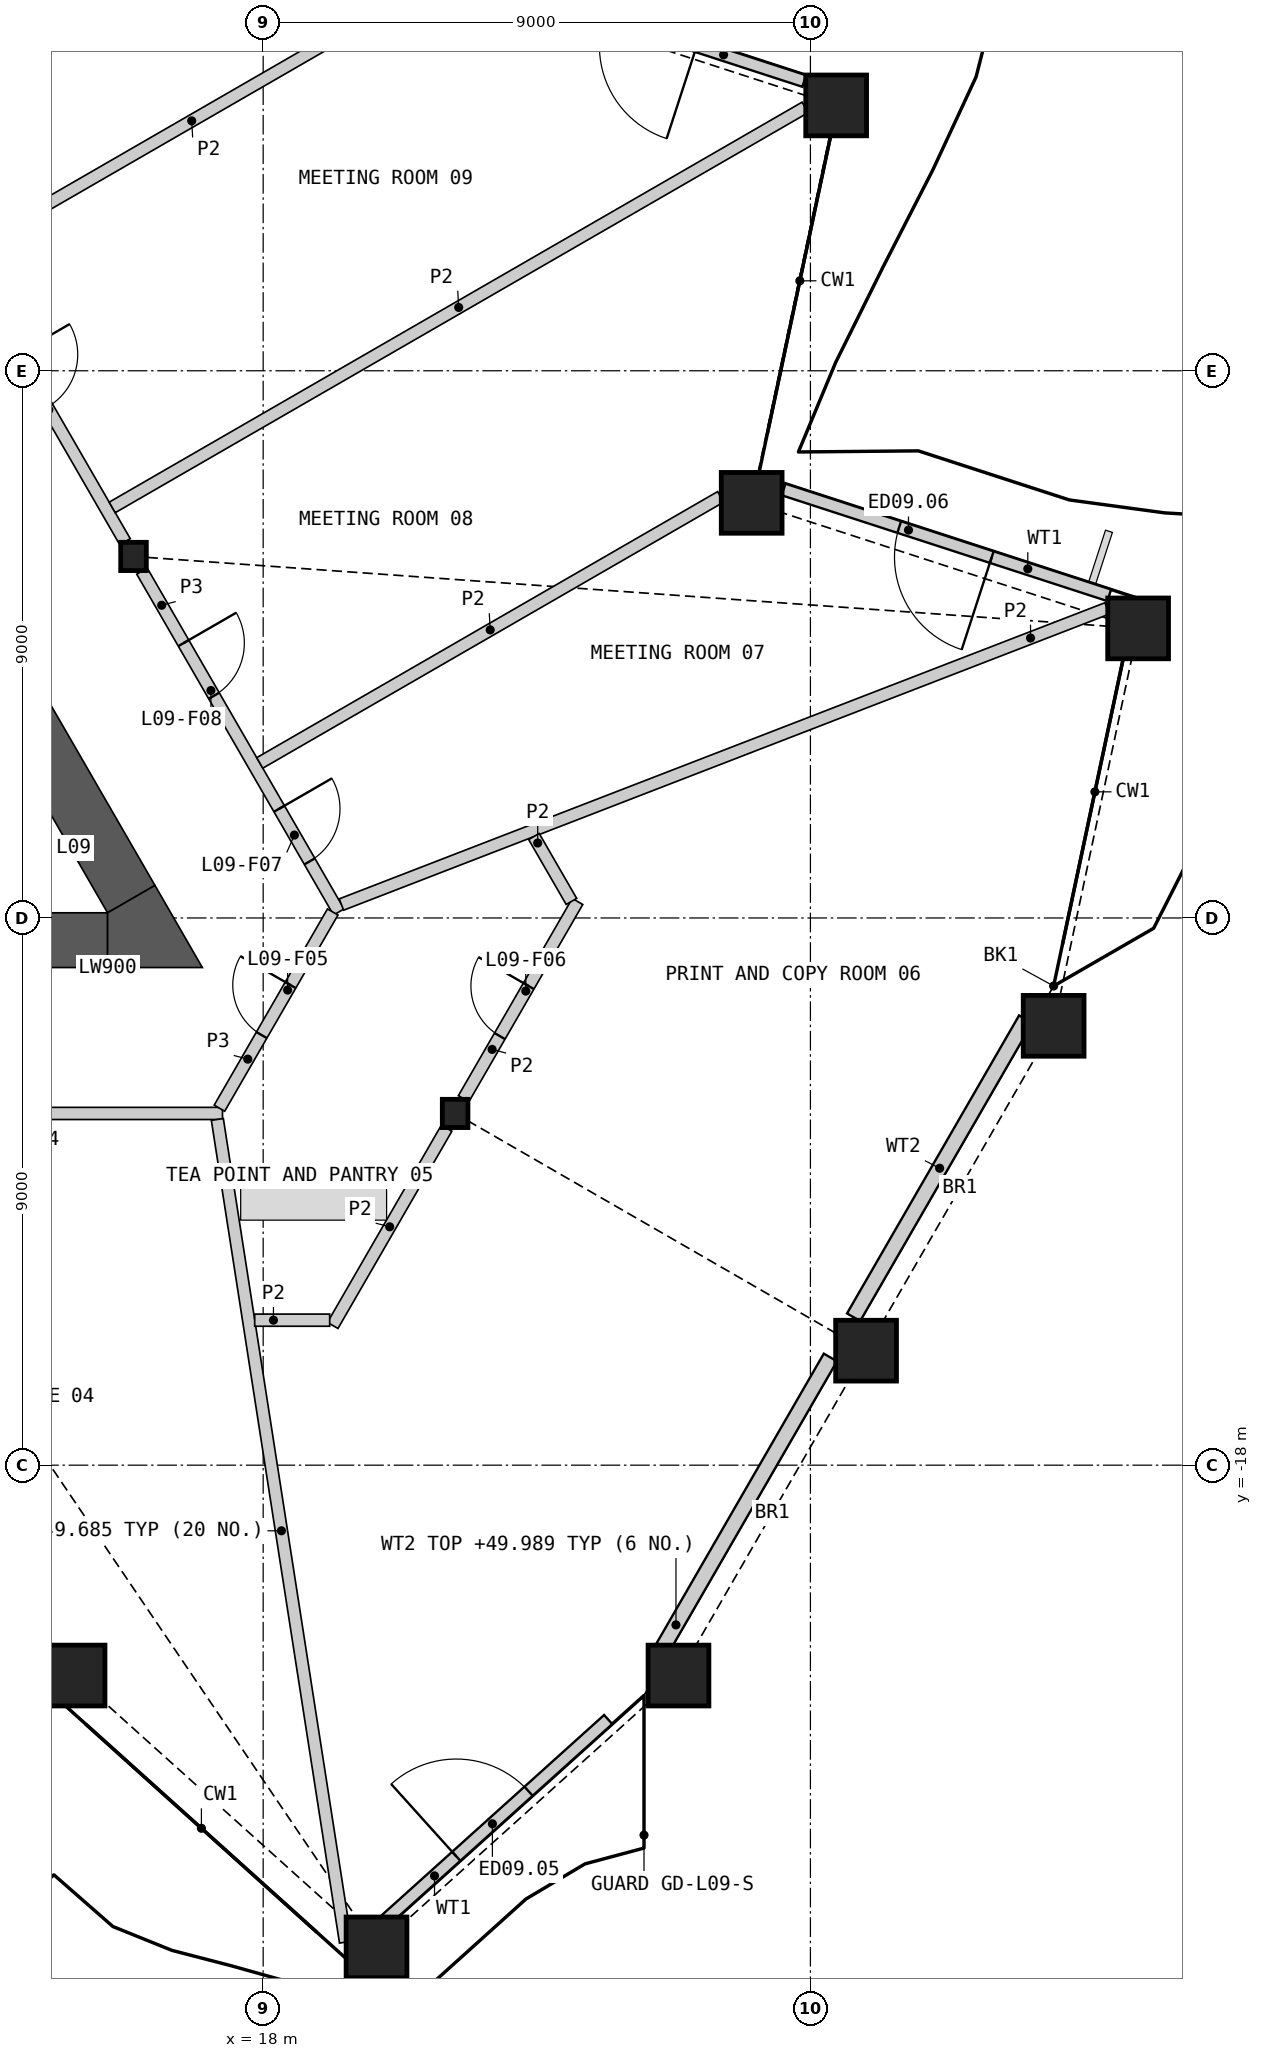
"""IFC4 building model, lengths in metres.
Left out: names, types, materials, properties, quantities, classifications, styles, units other than length and angle.
Written with IfcOpenShell. Run it as: python <this file> out.ifc"""

import sys

from ifc_helpers import new_model, si_unit, direction, frame, frame_2d, origin, origin_2d, place, context, subcontext, project, spatial, polyline, rectangle, hollow_rectangle, i_section, outline, extrude, element, fill, save


model = new_model("IFC4")
c1 = context("Model", 3, precision=1e-05, world=origin(), true_north=direction((0.0, 1.0)))
c2 = subcontext(c1, "Body", "Model", "MODEL_VIEW")
j1 = project(units=[si_unit("LENGTHUNIT", "METRE"), si_unit("PLANEANGLEUNIT", "RADIAN")], contexts=[c1])
p1 = place(None, origin())
s1 = spatial("IfcSite", under=j1, at=p1, CompositionType="ELEMENT")
p2 = place(p1, origin())
s2 = spatial("IfcBuilding", under=s1, at=p2, CompositionType="ELEMENT")
p3 = place(p2, frame((0.0, 0.0, 46.8)))
s3 = spatial("IfcBuildingStorey", under=s2, at=p3, CompositionType="ELEMENT", Elevation=46.8)
for number, where, z_axis, x_axis in (
    (1, (14.898, -21.46, 0.0), (0.0, 0.0, 1.0), (1.0, 0.0, 0.0)),
    (2, (19.864, -25.931, 0.0), (0.0, 0.0, 1.0), (1.0, 0.0, 0.0)),
    (3, (24.83, -21.46, 0.0), (0.0, 0.0, 1.0), (1.0, 0.0, 0.0)),
    (4, (27.915, -16.117, 0.0), (0.0, 0.0, 1.0), (1.0, 0.0, 0.0)),
    (5, (31.0, -10.774, 0.0), (0.0, 0.0, 1.0), (1.0, 0.0, 0.0)),
    (6, (32.389, -4.237, 0.0), (0.0, 0.0, 1.0), (1.0, 0.0, 0.0)),
    (7, (26.034, -2.172, 0.0), (0.0, 0.0, 1.0), (1.0, 0.0, 0.0)),
    (8, (27.423, 4.364, 0.0), (0.0, 0.0, 1.0), (1.0, 0.0, 0.0)),
):
    element("IfcColumn", number, at=place(p3, frame(where, z_axis=z_axis, x_axis=x_axis)), inside=s3, PredefinedType="COLUMN", context=c2, shape_type="SweptSolid", body=[
        extrude(hollow_rectangle(XDim=1.0, YDim=1.0, WallThickness=0.07, at=origin_2d()), origin(), (0.0, 0.0, 1.0), 4.2),
    ])
for number, where, z_axis, x_axis in (
    (9, (21.157, -12.215, 0.0), (0.0, 0.0, 1.0), (1.0, 0.0, 0.0)),
    (10, (15.868, -3.054, 0.0), (0.0, 0.0, 1.0), (1.0, 0.0, 0.0)),
):
    element("IfcColumn", number, at=place(p3, frame(where, z_axis=z_axis, x_axis=x_axis)), inside=s3, PredefinedType="COLUMN", context=c2, shape_type="SweptSolid", body=[
        extrude(i_section(OverallWidth=0.421, OverallDepth=0.465, WebThickness=0.045, FlangeThickness=0.072, at=origin_2d()), origin(), (0.0, 0.0, 1.0), 4.2),
    ])
p4 = place(p3, frame((19.866, -25.612, 0.0), z_axis=(0.0, 0.0, 1.0), x_axis=(0.743159085791, 0.669114768337, 0.0)))
e11 = element("IfcWall", 11, at=p4, inside=s3, PredefinedType="SOLIDWALL", context=c2, shape_type="SweptSolid", body=[
    extrude(rectangle(XDim=5.124, YDim=0.2, at=frame_2d((2.562, 0.0))), origin(), (0.0, 0.0, 1.0), 3.189),
])
p5 = place(p4, frame((1.762, 0.0, 0.0)))
e12 = element("IfcOpeningElement", 12, at=p5, cuts=e11, PredefinedType="OPENING", context=c2, shape_type="SweptSolid", body=[
    extrude(rectangle(XDim=1.6, YDim=2.4, at=frame_2d((0.8, 1.2))), frame((0.0, 0.11, 0.0), z_axis=(0.0, -1.0, 0.0), x_axis=(1.0, 0.0, 0.0)), (0.0, 0.0, 1.0), 0.22),
])
p6 = place(p3, frame((24.507, -21.116, 0.0), z_axis=(0.0, 0.0, 1.0), x_axis=(0.49999579099, 0.866027833844, 0.0)))
e13 = element("IfcWall", 13, at=p6, inside=s3, PredefinedType="SOLIDWALL", context=c2, shape_type="SweptSolid", body=[
    extrude(rectangle(XDim=5.644, YDim=0.25, at=frame_2d((2.822, 0.0))), origin(), (0.0, 0.0, 1.0), 3.189),
])
p7 = place(p3, frame((27.71, -15.567, 0.0), z_axis=(0.0, 0.0, 1.0), x_axis=(0.499985074313, 0.866034020963, 0.0)))
e14 = element("IfcWall", 14, at=p7, inside=s3, PredefinedType="SOLIDWALL", context=c2, shape_type="SweptSolid", body=[
    extrude(rectangle(XDim=5.66, YDim=0.25, at=frame_2d((2.83, 0.0))), origin(), (0.0, 0.0, 1.0), 3.189),
])
p8 = place(p3, frame((31.914, -3.693, 0.0), z_axis=(0.0, 0.0, 1.0), x_axis=(-0.951049360908, 0.309039015525, 0.0)))
e15 = element("IfcWall", 15, at=p8, inside=s3, PredefinedType="SOLIDWALL", context=c2, shape_type="SweptSolid", body=[
    extrude(rectangle(XDim=5.631, YDim=0.2, at=frame_2d((2.815, 0.0))), origin(), (0.0, 0.0, 1.0), 3.189),
])
p9 = place(p8, frame((2.031, 0.0, 0.0)))
e16 = element("IfcOpeningElement", 16, at=p9, cuts=e15, PredefinedType="OPENING", context=c2, shape_type="SweptSolid", body=[
    extrude(rectangle(XDim=1.6, YDim=2.4, at=frame_2d((0.8, 1.2))), frame((0.0, 0.11, 0.0), z_axis=(0.0, -1.0, 0.0), x_axis=(1.0, 0.0, 0.0)), (0.0, 0.0, 1.0), 0.22),
])
p10 = place(p3, frame((26.899, 4.765, 0.0), z_axis=(0.0, 0.0, 1.0), x_axis=(-0.951054004345, 0.309024725255, 0.0)))
e17 = element("IfcWall", 17, at=p10, inside=s3, PredefinedType="SOLIDWALL", context=c2, shape_type="SweptSolid", body=[
    extrude(rectangle(XDim=5.579, YDim=0.2, at=frame_2d((2.79, 0.0))), origin(), (0.0, 0.0, 1.0), 3.189),
])
p11 = place(p10, frame((1.86, 0.0, 0.0)))
e18 = element("IfcOpeningElement", 18, at=p11, cuts=e17, PredefinedType="OPENING", context=c2, shape_type="SweptSolid", body=[
    extrude(rectangle(XDim=1.6, YDim=2.4, at=frame_2d((0.8, 1.2))), frame((0.0, 0.11, 0.0), z_axis=(0.0, -1.0, 0.0), x_axis=(1.0, 0.0, 0.0)), (0.0, 0.0, 1.0), 0.22),
])
p12 = place(p3, frame((13.379, -9.365, 0.0), z_axis=(0.0, 0.0, 1.0), x_axis=(1.0, 0.0, 0.0)))
e19 = element("IfcWall", 19, at=p12, inside=s3, PredefinedType="SHEAR", context=c2, shape_type="SweptSolid", body=[
    extrude(rectangle(XDim=2.062, YDim=0.9, at=frame_2d((1.031, 0.0))), origin(), (0.0, 0.0, 1.0), 3.8),
])
p13 = place(p3, frame((15.831, -8.69, 0.0), z_axis=(0.0, 0.0, 1.0), x_axis=(-0.499999419053, 0.866025739194, 0.0)))
e20 = element("IfcWall", 20, at=p13, inside=s3, PredefinedType="SHEAR", context=c2, shape_type="SweptSolid", body=[
    extrude(rectangle(XDim=5.952, YDim=0.9, at=frame_2d((2.976, 0.0))), origin(), (0.0, 0.0, 1.0), 3.8),
])
p14 = place(p3, origin())
e21 = element("IfcWall", 21, at=p14, inside=s3, PredefinedType="SHEAR", context=c2, shape_type="SweptSolid", body=[
    extrude(outline(polyline([(15.441, -9.815), (15.441, -8.915), (16.221, -8.465), (17.0, -9.815), (15.441, -9.815)])), origin(), (0.0, 0.0, 1.0), 3.8),
])
p15 = place(p3, frame((10.719, 5.865, 0.0), z_axis=(0.0, 0.0, 1.0), x_axis=(0.49999175339, -0.866030164915, 0.0)))
e22 = element("IfcWall", 22, at=p15, inside=s3, PredefinedType="PARTITIONING", context=c2, shape_type="SweptSolid", body=[
    extrude(rectangle(XDim=10.019, YDim=0.2, at=frame_2d((5.009, 0.0))), origin(), (0.0, 0.0, 1.0), 3.8),
])
p16 = place(p15, frame((6.464, 0.0, 0.0)))
e23 = element("IfcOpeningElement", 23, at=p16, cuts=e22, PredefinedType="OPENING", context=c2, shape_type="SweptSolid", body=[
    extrude(rectangle(XDim=1.0, YDim=2.1, at=frame_2d((0.5, 1.05))), frame((0.0, 0.11, 0.0), z_axis=(0.0, -1.0, 0.0), x_axis=(1.0, 0.0, 0.0)), (0.0, 0.0, 1.0), 0.22),
])
p17 = place(p15, frame((1.753, 0.0, 0.0)))
e24 = element("IfcOpeningElement", 24, at=p17, cuts=e22, PredefinedType="OPENING", context=c2, shape_type="SweptSolid", body=[
    extrude(rectangle(XDim=1.0, YDim=2.1, at=frame_2d((0.5, 1.05))), frame((0.0, 0.11, 0.0), z_axis=(0.0, -1.0, 0.0), x_axis=(1.0, 0.0, 0.0)), (0.0, 0.0, 1.0), 0.22),
])
p18 = place(p3, frame((10.821, -12.215, 0.0), z_axis=(0.0, 0.0, 1.0), x_axis=(1.0, 0.0, 0.0)))
e25 = element("IfcWall", 25, at=p18, inside=s3, PredefinedType="PARTITIONING", context=c2, shape_type="SweptSolid", body=[
    extrude(rectangle(XDim=6.51, YDim=0.2, at=frame_2d((3.255, 0.0))), origin(), (0.0, 0.0, 1.0), 3.8),
])
p19 = place(p18, frame((2.655, 0.0, 0.0)))
e26 = element("IfcOpeningElement", 26, at=p19, cuts=e25, PredefinedType="OPENING", context=c2, shape_type="SweptSolid", body=[
    extrude(rectangle(XDim=1.0, YDim=2.1, at=frame_2d((0.5, 1.05))), frame((0.0, 0.11, 0.0), z_axis=(0.0, -1.0, 0.0), x_axis=(1.0, 0.0, 0.0)), (0.0, 0.0, 1.0), 0.22),
])
p20 = place(p3, frame((16.008, -3.296, 0.0), z_axis=(0.0, 0.0, 1.0), x_axis=(0.499984737558, -0.86603421538, 0.0)))
e27 = element("IfcWall", 27, at=p20, inside=s3, PredefinedType="PARTITIONING", context=c2, shape_type="SweptSolid", body=[
    extrude(rectangle(XDim=6.473, YDim=0.2, at=frame_2d((3.236, 0.0))), origin(), (0.0, 0.0, 1.0), 3.8),
])
p21 = place(p20, frame((4.512, 0.0, 0.0)))
e28 = element("IfcOpeningElement", 28, at=p21, cuts=e27, PredefinedType="OPENING", context=c2, shape_type="SweptSolid", body=[
    extrude(rectangle(XDim=1.0, YDim=2.1, at=frame_2d((0.5, 1.05))), frame((0.0, 0.11, 0.0), z_axis=(0.0, -1.0, 0.0), x_axis=(1.0, 0.0, 0.0)), (0.0, 0.0, 1.0), 0.22),
])
p22 = place(p20, frame((1.366, 0.0, 0.0)))
e29 = element("IfcOpeningElement", 29, at=p22, cuts=e27, PredefinedType="OPENING", context=c2, shape_type="SweptSolid", body=[
    extrude(rectangle(XDim=1.0, YDim=2.1, at=frame_2d((0.5, 1.05))), frame((0.0, 0.11, 0.0), z_axis=(0.0, -1.0, 0.0), x_axis=(1.0, 0.0, 0.0)), (0.0, 0.0, 1.0), 0.22),
])
p23 = place(p3, frame((17.281, -12.128, 0.0), z_axis=(0.0, 0.0, 1.0), x_axis=(0.499958791762, 0.866049194065, 0.0)))
e30 = element("IfcWall", 30, at=p23, inside=s3, PredefinedType="PARTITIONING", context=c2, shape_type="SweptSolid", body=[
    extrude(rectangle(XDim=3.726, YDim=0.2, at=frame_2d((1.863, 0.0))), origin(), (0.0, 0.0, 1.0), 3.8),
])
p24 = place(p23, frame((1.388, 0.0, 0.0)))
e31 = element("IfcOpeningElement", 31, at=p24, cuts=e30, PredefinedType="OPENING", context=c2, shape_type="SweptSolid", body=[
    extrude(rectangle(XDim=0.95, YDim=2.1, at=frame_2d((0.475, 1.05))), frame((0.0, 0.11, 0.0), z_axis=(0.0, -1.0, 0.0), x_axis=(1.0, 0.0, 0.0)), (0.0, 0.0, 1.0), 0.22),
])
p25 = place(p3, frame((17.246, -12.314, 0.0), z_axis=(0.0, 0.0, 1.0), x_axis=(0.153927101979, -0.98808220674, 0.0)))
e32 = element("IfcWall", 32, at=p25, inside=s3, PredefinedType="PARTITIONING", context=c2, shape_type="SweptSolid", body=[
    extrude(rectangle(XDim=13.694, YDim=0.2, at=frame_2d((6.847, 0.0))), origin(), (0.0, 0.0, 1.0), 2.885),
])
p26 = place(p3, frame((19.287, -8.779, 0.0), z_axis=(0.0, 0.0, 1.0), x_axis=(0.932669586354, 0.360731815467, 0.0)))
e33 = element("IfcWall", 33, at=p26, inside=s3, PredefinedType="PARTITIONING", context=c2, shape_type="SweptSolid", body=[
    extrude(rectangle(XDim=13.501, YDim=0.2, at=frame_2d((6.75, 0.0))), origin(), (0.0, 0.0, 1.0), 2.885),
])
p27 = place(p3, frame((15.518, -2.248, 0.0), z_axis=(0.0, 0.0, 1.0), x_axis=(0.866025231175, 0.500000298968, 0.0)))
e34 = element("IfcWall", 34, at=p27, inside=s3, PredefinedType="PARTITIONING", context=c2, shape_type="SweptSolid", body=[
    extrude(rectangle(XDim=13.159, YDim=0.2, at=frame_2d((6.579, 0.0))), origin(), (0.0, 0.0, 1.0), 2.885),
])
p28 = place(p3, frame((17.944, -6.45, 0.0), z_axis=(0.0, 0.0, 1.0), x_axis=(0.866025328989, 0.50000012955, 0.0)))
e35 = element("IfcWall", 35, at=p28, inside=s3, PredefinedType="PARTITIONING", context=c2, shape_type="SweptSolid", body=[
    extrude(rectangle(XDim=8.752, YDim=0.2, at=frame_2d((4.376, 0.0))), origin(), (0.0, 0.0, 1.0), 2.885),
])
p29 = place(p3, frame((13.091, 1.955, 0.0), z_axis=(0.0, 0.0, 1.0), x_axis=(0.866026670206, 0.499997806488, 0.0)))
e36 = element("IfcWall", 36, at=p29, inside=s3, PredefinedType="PARTITIONING", context=c2, shape_type="SweptSolid", body=[
    extrude(rectangle(XDim=8.622, YDim=0.2, at=frame_2d((4.311, 0.0))), origin(), (0.0, 0.0, 1.0), 2.885),
])
p30 = place(p3, frame((21.297, -11.973, 0.0), z_axis=(0.0, 0.0, 1.0), x_axis=(0.500008291124, 0.866020616849, 0.0)))
e37 = element("IfcWall", 37, at=p30, inside=s3, PredefinedType="PARTITIONING", context=c2, shape_type="SweptSolid", body=[
    extrude(rectangle(XDim=3.746, YDim=0.2, at=frame_2d((1.873, 0.0))), origin(), (0.0, 0.0, 1.0), 2.885),
])
p31 = place(p30, frame((1.189, 0.0, 0.0)))
e38 = element("IfcOpeningElement", 38, at=p31, cuts=e37, PredefinedType="OPENING", context=c2, shape_type="SweptSolid", body=[
    extrude(rectangle(XDim=0.95, YDim=2.1, at=frame_2d((0.475, 1.05))), frame((0.0, 0.11, 0.0), z_axis=(0.0, -1.0, 0.0), x_axis=(1.0, 0.0, 0.0)), (0.0, 0.0, 1.0), 0.22),
])
p32 = place(p3, frame((19.144, -15.702, 0.0), z_axis=(0.0, 0.0, 1.0), x_axis=(0.500028947347, 0.866008690381, 0.0)))
e39 = element("IfcWall", 39, at=p32, inside=s3, PredefinedType="PARTITIONING", context=c2, shape_type="SweptSolid", body=[
    extrude(rectangle(XDim=3.746, YDim=0.2, at=frame_2d((1.873, 0.0))), origin(), (0.0, 0.0, 1.0), 2.885),
])
p33 = place(p3, frame((22.453, -7.66, 0.0), z_axis=(0.0, 0.0, 1.0), x_axis=(0.499928040405, -0.86606694569, 0.0)))
e40 = element("IfcWall", 40, at=p33, inside=s3, PredefinedType="PARTITIONING", context=c2, shape_type="SweptSolid", body=[
    extrude(rectangle(XDim=1.234, YDim=0.2, at=frame_2d((0.617, 0.0))), origin(), (0.0, 0.0, 1.0), 2.885),
])
p34 = place(p3, frame((17.861, -15.615, 0.0), z_axis=(0.0, 0.0, 1.0), x_axis=(1.0, 0.0, 0.0)))
e41 = element("IfcWall", 41, at=p34, inside=s3, PredefinedType="PARTITIONING", context=c2, shape_type="SweptSolid", body=[
    extrude(rectangle(XDim=1.233, YDim=0.2, at=frame_2d((0.617, 0.0))), origin(), (0.0, 0.0, 1.0), 2.885),
])
p35 = place(p5, origin())
e42 = element("IfcDoor", 42, at=p35, inside=s3, OperationType="DOUBLE_DOOR_SINGLE_SWING", PredefinedType="DOOR", context=c2, shape_type="SweptSolid", body=[
    extrude(rectangle(XDim=1.6, YDim=2.4, at=frame_2d((0.8, 1.2))), frame((0.0, 0.025, 0.0), z_axis=(0.0, -1.0, 0.0), x_axis=(1.0, 0.0, 0.0)), (0.0, 0.0, 1.0), 0.05),
])
fill(e12, e42)
p36 = place(p9, origin())
e43 = element("IfcDoor", 43, at=p36, inside=s3, OperationType="DOUBLE_DOOR_SINGLE_SWING", PredefinedType="DOOR", context=c2, shape_type="SweptSolid", body=[
    extrude(rectangle(XDim=1.6, YDim=2.4, at=frame_2d((0.8, 1.2))), frame((0.0, 0.025, 0.0), z_axis=(0.0, -1.0, 0.0), x_axis=(1.0, 0.0, 0.0)), (0.0, 0.0, 1.0), 0.05),
])
fill(e16, e43)
p37 = place(p24, origin())
e44 = element("IfcDoor", 44, at=p37, inside=s3, OperationType="SINGLE_SWING_RIGHT", PredefinedType="DOOR", context=c2, shape_type="SweptSolid", body=[
    extrude(rectangle(XDim=0.95, YDim=2.1, at=frame_2d((0.475, 1.05))), frame((0.0, 0.025, 0.0), z_axis=(0.0, -1.0, 0.0), x_axis=(1.0, 0.0, 0.0)), (0.0, 0.0, 1.0), 0.05),
])
fill(e31, e44)
p38 = place(p31, origin())
e45 = element("IfcDoor", 45, at=p38, inside=s3, OperationType="SINGLE_SWING_RIGHT", PredefinedType="DOOR", context=c2, shape_type="SweptSolid", body=[
    extrude(rectangle(XDim=0.95, YDim=2.1, at=frame_2d((0.475, 1.05))), frame((0.0, 0.025, 0.0), z_axis=(0.0, -1.0, 0.0), x_axis=(1.0, 0.0, 0.0)), (0.0, 0.0, 1.0), 0.05),
])
fill(e38, e45)
p39 = place(p21, origin())
e46 = element("IfcDoor", 46, at=p39, inside=s3, OperationType="SINGLE_SWING_LEFT", PredefinedType="DOOR", context=c2, shape_type="SweptSolid", body=[
    extrude(rectangle(XDim=1.0, YDim=2.1, at=frame_2d((0.5, 1.05))), frame((0.0, 0.025, 0.0), z_axis=(0.0, -1.0, 0.0), x_axis=(1.0, 0.0, 0.0)), (0.0, 0.0, 1.0), 0.05),
])
fill(e28, e46)
p40 = place(p22, origin())
e47 = element("IfcDoor", 47, at=p40, inside=s3, OperationType="SINGLE_SWING_LEFT", PredefinedType="DOOR", context=c2, shape_type="SweptSolid", body=[
    extrude(rectangle(XDim=1.0, YDim=2.1, at=frame_2d((0.5, 1.05))), frame((0.0, 0.025, 0.0), z_axis=(0.0, -1.0, 0.0), x_axis=(1.0, 0.0, 0.0)), (0.0, 0.0, 1.0), 0.05),
])
fill(e29, e47)
save(model, sys.argv[1])
